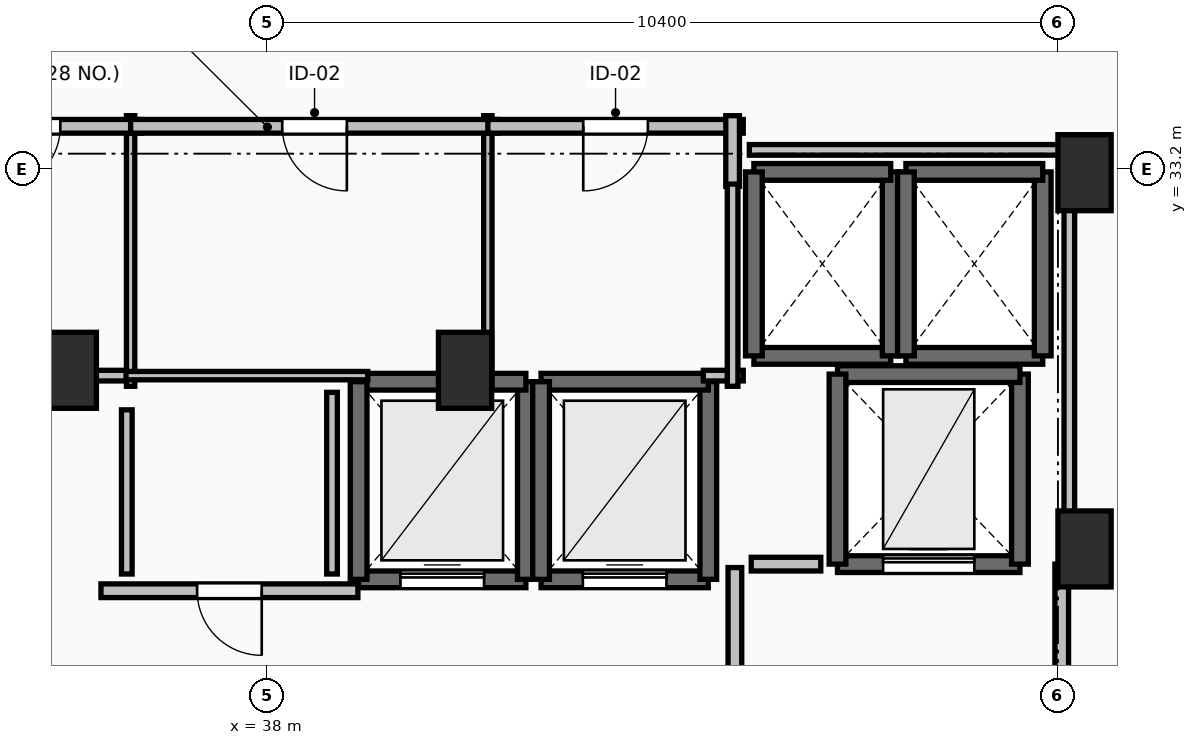
"""IFC4 building model, lengths in metres.
Left out: names, types, materials, properties, quantities, classifications, styles, units other than length and angle.
Written with IfcOpenShell. Run it as: python <this file> out.ifc"""

import sys

from ifc_helpers import new_model, si_unit, direction, frame, frame_2d, origin, origin_2d, place, context, subcontext, project, spatial, rectangle, extrude, element, fill, save


model = new_model("IFC4")
c1 = context("Model", 3, precision=1e-05, world=origin(), true_north=direction((0.0, 1.0)))
c2 = subcontext(c1, "Body", "Model", "MODEL_VIEW")
j1 = project(units=[si_unit("LENGTHUNIT", "METRE"), si_unit("PLANEANGLEUNIT", "RADIAN")], contexts=[c1])
p1 = place(None, origin())
s1 = spatial("IfcSite", under=j1, at=p1, CompositionType="ELEMENT")
p2 = place(p1, origin())
s2 = spatial("IfcBuilding", under=s1, at=p2, CompositionType="ELEMENT")
p3 = place(p2, frame((0.0, 0.0, 259.1)))
s3 = spatial("IfcBuildingStorey", under=s2, at=p3, CompositionType="ELEMENT", Elevation=259.1)
for number, where, z_axis, x_axis in (
    (1, (48.75, 33.15, 0.0), (0.0, 0.0, 1.0), (1.0, 0.0, 0.0)),
    (2, (48.75, 28.2, 0.0), (0.0, 0.0, 1.0), (1.0, 0.0, 0.0)),
    (3, (35.4, 30.55, 0.0), (0.0, 0.0, 1.0), (1.0, 0.0, 0.0)),
    (4, (40.6, 30.55, 0.0), (0.0, 0.0, 1.0), (1.0, 0.0, 0.0)),
):
    element("IfcColumn", number, at=place(p3, frame(where, z_axis=z_axis, x_axis=x_axis)), inside=s3, PredefinedType="PILASTER", context=c2, shape_type="SweptSolid", body=[
        extrude(rectangle(XDim=0.7, YDim=1.0, at=origin_2d()), origin(), (0.0, 0.0, 1.0), 3.55),
    ])
p4 = place(p3, frame((39.2, 27.8, 0.0), z_axis=(0.0, 0.0, 1.0), x_axis=(1.0, 0.0, 0.0)))
e5 = element("IfcWall", 5, at=p4, inside=s3, PredefinedType="SOLIDWALL", context=c2, shape_type="SweptSolid", body=[
    extrude(rectangle(XDim=2.2, YDim=0.22, at=frame_2d((1.1, 0.0))), origin(), (0.0, 0.0, 1.0), 3.29),
])
p5 = place(p4, frame((0.55, 0.0, 0.0)))
e6 = element("IfcOpeningElement", 6, at=p5, cuts=e5, PredefinedType="OPENING", context=c2, shape_type="SweptSolid", body=[
    extrude(rectangle(XDim=1.1, YDim=2.2, at=frame_2d((0.55, 1.1))), frame((0.0, 0.125, 0.0), z_axis=(0.0, -1.0, 0.0), x_axis=(1.0, 0.0, 0.0)), (0.0, 0.0, 1.0), 0.25),
])
p6 = place(p3, frame((41.4, 27.8, 0.0), z_axis=(0.0, 0.0, 1.0), x_axis=(0.0, 1.0, 0.0)))
e7 = element("IfcWall", 7, at=p6, inside=s3, PredefinedType="SOLIDWALL", context=c2, shape_type="SweptSolid", body=[
    extrude(rectangle(XDim=2.6, YDim=0.22, at=frame_2d((1.3, 0.0))), origin(), (0.0, 0.0, 1.0), 3.29),
])
p7 = place(p3, frame((41.4, 30.4, 0.0), z_axis=(0.0, 0.0, 1.0), x_axis=(-1.0, 0.0, 0.0)))
e8 = element("IfcWall", 8, at=p7, inside=s3, PredefinedType="SOLIDWALL", context=c2, shape_type="SweptSolid", body=[
    extrude(rectangle(XDim=2.2, YDim=0.22, at=frame_2d((1.1, 0.0))), origin(), (0.0, 0.0, 1.0), 3.29),
])
p8 = place(p3, frame((39.2, 30.4, 0.0), z_axis=(0.0, 0.0, 1.0), x_axis=(0.0, -1.0, 0.0)))
e9 = element("IfcWall", 9, at=p8, inside=s3, PredefinedType="SOLIDWALL", context=c2, shape_type="SweptSolid", body=[
    extrude(rectangle(XDim=2.6, YDim=0.22, at=frame_2d((1.3, 0.0))), origin(), (0.0, 0.0, 1.0), 3.29),
])
p9 = place(p3, frame((41.6, 27.8, 0.0), z_axis=(0.0, 0.0, 1.0), x_axis=(1.0, 0.0, 0.0)))
e10 = element("IfcWall", 10, at=p9, inside=s3, PredefinedType="SOLIDWALL", context=c2, shape_type="SweptSolid", body=[
    extrude(rectangle(XDim=2.2, YDim=0.22, at=frame_2d((1.1, 0.0))), origin(), (0.0, 0.0, 1.0), 3.29),
])
p10 = place(p9, frame((0.55, 0.0, 0.0)))
e11 = element("IfcOpeningElement", 11, at=p10, cuts=e10, PredefinedType="OPENING", context=c2, shape_type="SweptSolid", body=[
    extrude(rectangle(XDim=1.1, YDim=2.2, at=frame_2d((0.55, 1.1))), frame((0.0, 0.125, 0.0), z_axis=(0.0, -1.0, 0.0), x_axis=(1.0, 0.0, 0.0)), (0.0, 0.0, 1.0), 0.25),
])
p11 = place(p3, frame((43.8, 27.8, 0.0), z_axis=(0.0, 0.0, 1.0), x_axis=(0.0, 1.0, 0.0)))
e12 = element("IfcWall", 12, at=p11, inside=s3, PredefinedType="SOLIDWALL", context=c2, shape_type="SweptSolid", body=[
    extrude(rectangle(XDim=2.6, YDim=0.22, at=frame_2d((1.3, 0.0))), origin(), (0.0, 0.0, 1.0), 3.29),
])
p12 = place(p3, frame((43.8, 30.4, 0.0), z_axis=(0.0, 0.0, 1.0), x_axis=(-1.0, 0.0, 0.0)))
e13 = element("IfcWall", 13, at=p12, inside=s3, PredefinedType="SOLIDWALL", context=c2, shape_type="SweptSolid", body=[
    extrude(rectangle(XDim=2.2, YDim=0.22, at=frame_2d((1.1, 0.0))), origin(), (0.0, 0.0, 1.0), 3.29),
])
p13 = place(p3, frame((41.6, 30.4, 0.0), z_axis=(0.0, 0.0, 1.0), x_axis=(0.0, -1.0, 0.0)))
e14 = element("IfcWall", 14, at=p13, inside=s3, PredefinedType="SOLIDWALL", context=c2, shape_type="SweptSolid", body=[
    extrude(rectangle(XDim=2.6, YDim=0.22, at=frame_2d((1.3, 0.0))), origin(), (0.0, 0.0, 1.0), 3.29),
])
p14 = place(p3, frame((44.4, 30.74, 0.0), z_axis=(0.0, 0.0, 1.0), x_axis=(1.0, 0.0, 0.0)))
e15 = element("IfcWall", 15, at=p14, inside=s3, PredefinedType="SOLIDWALL", context=c2, shape_type="SweptSolid", body=[
    extrude(rectangle(XDim=1.8, YDim=0.22, at=frame_2d((0.9, 0.0))), origin(), (0.0, 0.0, 1.0), 3.29),
])
p15 = place(p3, frame((46.2, 30.74, 0.0), z_axis=(0.0, 0.0, 1.0), x_axis=(0.0, 1.0, 0.0)))
e16 = element("IfcWall", 16, at=p15, inside=s3, PredefinedType="SOLIDWALL", context=c2, shape_type="SweptSolid", body=[
    extrude(rectangle(XDim=2.42, YDim=0.22, at=frame_2d((1.21, 0.0))), origin(), (0.0, 0.0, 1.0), 3.29),
])
p16 = place(p3, frame((46.2, 33.16, 0.0), z_axis=(0.0, 0.0, 1.0), x_axis=(-1.0, 0.0, 0.0)))
e17 = element("IfcWall", 17, at=p16, inside=s3, PredefinedType="SOLIDWALL", context=c2, shape_type="SweptSolid", body=[
    extrude(rectangle(XDim=1.8, YDim=0.22, at=frame_2d((0.9, 0.0))), origin(), (0.0, 0.0, 1.0), 3.29),
])
p17 = place(p3, frame((44.4, 33.16, 0.0), z_axis=(0.0, 0.0, 1.0), x_axis=(0.0, -1.0, 0.0)))
e18 = element("IfcWall", 18, at=p17, inside=s3, PredefinedType="SOLIDWALL", context=c2, shape_type="SweptSolid", body=[
    extrude(rectangle(XDim=2.42, YDim=0.22, at=frame_2d((1.21, 0.0))), origin(), (0.0, 0.0, 1.0), 3.29),
])
p18 = place(p3, frame((46.4, 30.74, 0.0), z_axis=(0.0, 0.0, 1.0), x_axis=(1.0, 0.0, 0.0)))
e19 = element("IfcWall", 19, at=p18, inside=s3, PredefinedType="SOLIDWALL", context=c2, shape_type="SweptSolid", body=[
    extrude(rectangle(XDim=1.8, YDim=0.22, at=frame_2d((0.9, 0.0))), origin(), (0.0, 0.0, 1.0), 3.29),
])
p19 = place(p3, frame((48.2, 30.74, 0.0), z_axis=(0.0, 0.0, 1.0), x_axis=(0.0, 1.0, 0.0)))
e20 = element("IfcWall", 20, at=p19, inside=s3, PredefinedType="SOLIDWALL", context=c2, shape_type="SweptSolid", body=[
    extrude(rectangle(XDim=2.42, YDim=0.22, at=frame_2d((1.21, 0.0))), origin(), (0.0, 0.0, 1.0), 3.29),
])
p20 = place(p3, frame((48.2, 33.16, 0.0), z_axis=(0.0, 0.0, 1.0), x_axis=(-1.0, 0.0, 0.0)))
e21 = element("IfcWall", 21, at=p20, inside=s3, PredefinedType="SOLIDWALL", context=c2, shape_type="SweptSolid", body=[
    extrude(rectangle(XDim=1.8, YDim=0.22, at=frame_2d((0.9, 0.0))), origin(), (0.0, 0.0, 1.0), 3.29),
])
p21 = place(p3, frame((46.4, 33.16, 0.0), z_axis=(0.0, 0.0, 1.0), x_axis=(0.0, -1.0, 0.0)))
e22 = element("IfcWall", 22, at=p21, inside=s3, PredefinedType="SOLIDWALL", context=c2, shape_type="SweptSolid", body=[
    extrude(rectangle(XDim=2.42, YDim=0.22, at=frame_2d((1.21, 0.0))), origin(), (0.0, 0.0, 1.0), 3.29),
])
p22 = place(p3, frame((45.5, 28.0, 0.0), z_axis=(0.0, 0.0, 1.0), x_axis=(1.0, 0.0, 0.0)))
e23 = element("IfcWall", 23, at=p22, inside=s3, PredefinedType="SHEAR", context=c2, shape_type="SweptSolid", body=[
    extrude(rectangle(XDim=2.4, YDim=0.22, at=frame_2d((1.2, 0.0))), origin(), (0.0, 0.0, 1.0), 3.29),
])
p23 = place(p22, frame((0.6, 0.0, 0.0)))
e24 = element("IfcOpeningElement", 24, at=p23, cuts=e23, PredefinedType="OPENING", context=c2, shape_type="SweptSolid", body=[
    extrude(rectangle(XDim=1.2, YDim=2.2, at=frame_2d((0.6, 1.1))), frame((0.0, 0.125, 0.0), z_axis=(0.0, -1.0, 0.0), x_axis=(1.0, 0.0, 0.0)), (0.0, 0.0, 1.0), 0.25),
])
p24 = place(p3, frame((47.9, 28.0, 0.0), z_axis=(0.0, 0.0, 1.0), x_axis=(0.0, 1.0, 0.0)))
e25 = element("IfcWall", 25, at=p24, inside=s3, PredefinedType="SHEAR", context=c2, shape_type="SweptSolid", body=[
    extrude(rectangle(XDim=2.5, YDim=0.22, at=frame_2d((1.25, 0.0))), origin(), (0.0, 0.0, 1.0), 3.29),
])
p25 = place(p3, frame((47.9, 30.5, 0.0), z_axis=(0.0, 0.0, 1.0), x_axis=(-1.0, 0.0, 0.0)))
e26 = element("IfcWall", 26, at=p25, inside=s3, PredefinedType="SHEAR", context=c2, shape_type="SweptSolid", body=[
    extrude(rectangle(XDim=2.4, YDim=0.22, at=frame_2d((1.2, 0.0))), origin(), (0.0, 0.0, 1.0), 3.29),
])
p26 = place(p3, frame((45.5, 30.5, 0.0), z_axis=(0.0, 0.0, 1.0), x_axis=(0.0, -1.0, 0.0)))
e27 = element("IfcWall", 27, at=p26, inside=s3, PredefinedType="SHEAR", context=c2, shape_type="SweptSolid", body=[
    extrude(rectangle(XDim=2.5, YDim=0.22, at=frame_2d((1.25, 0.0))), origin(), (0.0, 0.0, 1.0), 3.29),
])
p27 = place(p3, frame((44.15, 27.955, 0.0), z_axis=(0.0, 0.0, 1.0), x_axis=(0.0, -1.0, 0.0)))
e28 = element("IfcWall", 28, at=p27, inside=s3, PredefinedType="PARTITIONING", context=c2, shape_type="SweptSolid", body=[
    extrude(rectangle(XDim=3.91, YDim=0.18, at=frame_2d((1.955, 0.0))), origin(), (0.0, 0.0, 1.0), 3.29),
])
p28 = place(p27, frame((1.355, 0.0, 0.0)))
e29 = element("IfcOpeningElement", 29, at=p28, cuts=e28, PredefinedType="OPENING", context=c2, shape_type="SweptSolid", body=[
    extrude(rectangle(XDim=1.2, YDim=2.15, at=frame_2d((0.6, 1.075))), frame((0.0, 0.105, 0.0), z_axis=(0.0, -1.0, 0.0), x_axis=(1.0, 0.0, 0.0)), (0.0, 0.0, 1.0), 0.21),
])
p29 = place(p3, frame((48.45, 23.95, 0.0), z_axis=(0.0, 0.0, 1.0), x_axis=(0.0, 1.0, 0.0)))
e30 = element("IfcWall", 30, at=p29, inside=s3, PredefinedType="PARTITIONING", context=c2, shape_type="SweptSolid", body=[
    extrude(rectangle(XDim=4.05, YDim=0.18, at=frame_2d((2.025, 0.0))), origin(), (0.0, 0.0, 1.0), 3.29),
])
p30 = place(p29, frame((1.425, 0.0, 0.0)))
e31 = element("IfcOpeningElement", 31, at=p30, cuts=e30, PredefinedType="OPENING", context=c2, shape_type="SweptSolid", body=[
    extrude(rectangle(XDim=1.2, YDim=2.15, at=frame_2d((0.6, 1.075))), frame((0.0, 0.105, 0.0), z_axis=(0.0, -1.0, 0.0), x_axis=(1.0, 0.0, 0.0)), (0.0, 0.0, 1.0), 0.21),
])
p31 = place(p3, frame((39.19, 27.65, 0.0), z_axis=(0.0, 0.0, 1.0), x_axis=(-1.0, 0.0, 0.0)))
e32 = element("IfcWall", 32, at=p31, inside=s3, PredefinedType="PARTITIONING", context=c2, shape_type="SweptSolid", body=[
    extrude(rectangle(XDim=3.38, YDim=0.18, at=frame_2d((1.69, 0.0))), origin(), (0.0, 0.0, 1.0), 3.29),
])
p32 = place(p31, frame((1.265, 0.0, 0.0)))
e33 = element("IfcOpeningElement", 33, at=p32, cuts=e32, PredefinedType="OPENING", context=c2, shape_type="SweptSolid", body=[
    extrude(rectangle(XDim=0.85, YDim=2.1, at=frame_2d((0.425, 1.05))), frame((0.0, 0.105, 0.0), z_axis=(0.0, -1.0, 0.0), x_axis=(1.0, 0.0, 0.0)), (0.0, 0.0, 1.0), 0.21),
])
p33 = place(p3, frame((36.2, 30.34, 0.0), z_axis=(0.0, 0.0, 1.0), x_axis=(0.0, 1.0, 0.0)))
e34 = element("IfcWall", 34, at=p33, inside=s3, PredefinedType="PARTITIONING", context=c2, shape_type="SweptSolid", body=[
    extrude(rectangle(XDim=3.56, YDim=0.11, at=frame_2d((1.78, 0.0))), origin(), (0.0, 0.0, 1.0), 2.482),
])
p34 = place(p3, frame((36.34, 33.76, 0.0), z_axis=(0.0, 0.0, 1.0), x_axis=(-1.0, 0.0, 0.0)))
e35 = element("IfcWall", 35, at=p34, inside=s3, PredefinedType="PARTITIONING", context=c2, shape_type="SweptSolid", body=[
    extrude(rectangle(XDim=2.98, YDim=0.18, at=frame_2d((1.49, 0.0))), origin(), (0.0, 0.0, 1.0), 3.29),
])
p35 = place(p34, frame((1.065, 0.0, 0.0)))
e36 = element("IfcOpeningElement", 36, at=p35, cuts=e35, PredefinedType="OPENING", context=c2, shape_type="SweptSolid", body=[
    extrude(rectangle(XDim=0.85, YDim=2.1, at=frame_2d((0.425, 1.05))), frame((0.0, 0.105, 0.0), z_axis=(0.0, -1.0, 0.0), x_axis=(1.0, 0.0, 0.0)), (0.0, 0.0, 1.0), 0.21),
])
p36 = place(p3, frame((40.9, 30.34, 0.0), z_axis=(0.0, 0.0, 1.0), x_axis=(0.0, 1.0, 0.0)))
e37 = element("IfcWall", 37, at=p36, inside=s3, PredefinedType="PARTITIONING", context=c2, shape_type="SweptSolid", body=[
    extrude(rectangle(XDim=3.56, YDim=0.11, at=frame_2d((1.78, 0.0))), origin(), (0.0, 0.0, 1.0), 3.29),
])
p37 = place(p3, frame((36.11, 30.48, 0.0), z_axis=(0.0, 0.0, 1.0), x_axis=(1.0, 0.0, 0.0)))
e38 = element("IfcWall", 38, at=p37, inside=s3, PredefinedType="PARTITIONING", context=c2, shape_type="SweptSolid", body=[
    extrude(rectangle(XDim=3.21, YDim=0.11, at=frame_2d((1.605, 0.0))), origin(), (0.0, 0.0, 1.0), 2.482),
])
p38 = place(p3, frame((41.04, 33.76, 0.0), z_axis=(0.0, 0.0, 1.0), x_axis=(-1.0, 0.0, 0.0)))
e39 = element("IfcWall", 39, at=p38, inside=s3, PredefinedType="PARTITIONING", context=c2, shape_type="SweptSolid", body=[
    extrude(rectangle(XDim=4.84, YDim=0.18, at=frame_2d((2.42, 0.0))), origin(), (0.0, 0.0, 1.0), 3.29),
])
p39 = place(p38, frame((1.995, 0.0, 0.0)))
e40 = element("IfcOpeningElement", 40, at=p39, cuts=e39, PredefinedType="OPENING", context=c2, shape_type="SweptSolid", body=[
    extrude(rectangle(XDim=0.85, YDim=2.1, at=frame_2d((0.425, 1.05))), frame((0.0, 0.105, 0.0), z_axis=(0.0, -1.0, 0.0), x_axis=(1.0, 0.0, 0.0)), (0.0, 0.0, 1.0), 0.21),
])
p40 = place(p3, frame((44.26, 33.76, 0.0), z_axis=(0.0, 0.0, 1.0), x_axis=(-1.0, 0.0, 0.0)))
e41 = element("IfcWall", 41, at=p40, inside=s3, PredefinedType="PARTITIONING", context=c2, shape_type="SweptSolid", body=[
    extrude(rectangle(XDim=3.36, YDim=0.18, at=frame_2d((1.68, 0.0))), origin(), (0.0, 0.0, 1.0), 3.29),
])
p41 = place(p40, frame((1.255, 0.0, 0.0)))
e42 = element("IfcOpeningElement", 42, at=p41, cuts=e41, PredefinedType="OPENING", context=c2, shape_type="SweptSolid", body=[
    extrude(rectangle(XDim=0.85, YDim=2.1, at=frame_2d((0.425, 1.05))), frame((0.0, 0.105, 0.0), z_axis=(0.0, -1.0, 0.0), x_axis=(1.0, 0.0, 0.0)), (0.0, 0.0, 1.0), 0.21),
])
p42 = place(p3, frame((44.12, 32.97, 0.0), z_axis=(0.0, 0.0, 1.0), x_axis=(0.0, 1.0, 0.0)))
e43 = element("IfcWall", 43, at=p42, inside=s3, PredefinedType="PARTITIONING", context=c2, shape_type="SweptSolid", body=[
    extrude(rectangle(XDim=0.93, YDim=0.18, at=frame_2d((0.465, 0.0))), origin(), (0.0, 0.0, 1.0), 3.29),
])
p43 = place(p3, frame((45.28, 28.0, 0.0), z_axis=(0.0, 0.0, 1.0), x_axis=(-1.0, 0.0, 0.0)))
e44 = element("IfcWall", 44, at=p43, inside=s3, PredefinedType="PARTITIONING", context=c2, shape_type="SweptSolid", body=[
    extrude(rectangle(XDim=0.915, YDim=0.18, at=frame_2d((0.458, 0.0))), origin(), (0.0, 0.0, 1.0), 3.29),
])
p44 = place(p3, frame((35.14, 30.48, 0.0), z_axis=(0.0, 0.0, 1.0), x_axis=(1.0, 0.0, 0.0)))
e45 = element("IfcWall", 45, at=p44, inside=s3, PredefinedType="PARTITIONING", context=c2, shape_type="SweptSolid", body=[
    extrude(rectangle(XDim=1.0, YDim=0.14, at=frame_2d((0.5, 0.0))), origin(), (0.0, 0.0, 1.0), 2.482),
])
p45 = place(p3, frame((43.735, 30.48, 0.0), z_axis=(0.0, 0.0, 1.0), x_axis=(1.0, 0.0, 0.0)))
e46 = element("IfcWall", 46, at=p45, inside=s3, PredefinedType="PARTITIONING", context=c2, shape_type="SweptSolid", body=[
    extrude(rectangle(XDim=0.525, YDim=0.14, at=frame_2d((0.262, 0.0))), origin(), (0.0, 0.0, 1.0), 3.29),
])
p46 = place(p3, frame((44.12, 30.34, 0.0), z_axis=(0.0, 0.0, 1.0), x_axis=(0.0, 1.0, 0.0)))
e47 = element("IfcWall", 47, at=p46, inside=s3, PredefinedType="PARTITIONING", context=c2, shape_type="SweptSolid", body=[
    extrude(rectangle(XDim=2.66, YDim=0.14, at=frame_2d((1.33, 0.0))), origin(), (0.0, 0.0, 1.0), 3.29),
])
p47 = place(p3, frame((36.15, 30.03, 0.0), z_axis=(0.0, 0.0, 1.0), x_axis=(0.0, -1.0, 0.0)))
e48 = element("IfcWall", 48, at=p47, inside=s3, PredefinedType="PARTITIONING", context=c2, shape_type="SweptSolid", body=[
    extrude(rectangle(XDim=2.16, YDim=0.14, at=frame_2d((1.08, 0.0))), origin(), (0.0, 0.0, 1.0), 3.29),
])
p48 = place(p3, frame((38.85, 27.87, 0.0), z_axis=(0.0, 0.0, 1.0), x_axis=(0.0, 1.0, 0.0)))
e49 = element("IfcWall", 49, at=p48, inside=s3, PredefinedType="PARTITIONING", context=c2, shape_type="SweptSolid", body=[
    extrude(rectangle(XDim=2.39, YDim=0.14, at=frame_2d((1.195, 0.0))), origin(), (0.0, 0.0, 1.0), 3.29),
])
p49 = place(p3, frame((48.55, 28.196, 0.0), z_axis=(0.0, 0.0, 1.0), x_axis=(0.0, 1.0, 0.0)))
e50 = element("IfcWall", 50, at=p49, inside=s3, PredefinedType="PARTITIONING", context=c2, shape_type="SweptSolid", body=[
    extrude(rectangle(XDim=5.254, YDim=0.14, at=frame_2d((2.627, 0.0))), origin(), (0.0, 0.0, 1.0), 2.482),
])
p50 = place(p3, frame((48.55, 33.45, 0.0), z_axis=(0.0, 0.0, 1.0), x_axis=(-1.0, 0.0, 0.0)))
e51 = element("IfcWall", 51, at=p50, inside=s3, PredefinedType="PARTITIONING", context=c2, shape_type="SweptSolid", body=[
    extrude(rectangle(XDim=4.21, YDim=0.14, at=frame_2d((2.105, 0.0))), origin(), (0.0, 0.0, 1.0), 2.482),
])
p51 = place(p5, origin())
e52 = element("IfcDoor", 52, at=p51, inside=s3, OperationType="SLIDING_TO_LEFT", PredefinedType="DOOR", context=c2, shape_type="SweptSolid", body=[
    extrude(rectangle(XDim=1.1, YDim=2.2, at=frame_2d((0.55, 1.1))), frame((0.0, 0.025, 0.0), z_axis=(0.0, -1.0, 0.0), x_axis=(1.0, 0.0, 0.0)), (0.0, 0.0, 1.0), 0.05),
])
fill(e6, e52)
p52 = place(p10, origin())
e53 = element("IfcDoor", 53, at=p52, inside=s3, OperationType="SLIDING_TO_LEFT", PredefinedType="DOOR", context=c2, shape_type="SweptSolid", body=[
    extrude(rectangle(XDim=1.1, YDim=2.2, at=frame_2d((0.55, 1.1))), frame((0.0, 0.025, 0.0), z_axis=(0.0, -1.0, 0.0), x_axis=(1.0, 0.0, 0.0)), (0.0, 0.0, 1.0), 0.05),
])
fill(e11, e53)
p53 = place(p23, origin())
e54 = element("IfcDoor", 54, at=p53, inside=s3, OperationType="SLIDING_TO_LEFT", PredefinedType="DOOR", context=c2, shape_type="SweptSolid", body=[
    extrude(rectangle(XDim=1.2, YDim=2.2, at=frame_2d((0.6, 1.1))), frame((0.0, 0.025, 0.0), z_axis=(0.0, -1.0, 0.0), x_axis=(1.0, 0.0, 0.0)), (0.0, 0.0, 1.0), 0.05),
])
fill(e24, e54)
p54 = place(p32, origin())
e55 = element("IfcDoor", 55, at=p54, inside=s3, OperationType="SINGLE_SWING_LEFT", PredefinedType="DOOR", context=c2, shape_type="SweptSolid", body=[
    extrude(rectangle(XDim=0.85, YDim=2.1, at=frame_2d((0.425, 1.05))), frame((0.0, 0.025, 0.0), z_axis=(0.0, -1.0, 0.0), x_axis=(1.0, 0.0, 0.0)), (0.0, 0.0, 1.0), 0.05),
])
fill(e33, e55)
p55 = place(p35, origin())
e56 = element("IfcDoor", 56, at=p55, inside=s3, OperationType="SINGLE_SWING_RIGHT", PredefinedType="DOOR", context=c2, shape_type="SweptSolid", body=[
    extrude(rectangle(XDim=0.85, YDim=2.1, at=frame_2d((0.425, 1.05))), frame((0.0, 0.025, 0.0), z_axis=(0.0, -1.0, 0.0), x_axis=(1.0, 0.0, 0.0)), (0.0, 0.0, 1.0), 0.05),
])
fill(e36, e56)
p56 = place(p39, origin())
e57 = element("IfcDoor", 57, at=p56, inside=s3, OperationType="SINGLE_SWING_LEFT", PredefinedType="DOOR", context=c2, shape_type="SweptSolid", body=[
    extrude(rectangle(XDim=0.85, YDim=2.1, at=frame_2d((0.425, 1.05))), frame((0.0, 0.025, 0.0), z_axis=(0.0, -1.0, 0.0), x_axis=(1.0, 0.0, 0.0)), (0.0, 0.0, 1.0), 0.05),
])
fill(e40, e57)
p57 = place(p41, origin())
e58 = element("IfcDoor", 58, at=p57, inside=s3, OperationType="SINGLE_SWING_RIGHT", PredefinedType="DOOR", context=c2, shape_type="SweptSolid", body=[
    extrude(rectangle(XDim=0.85, YDim=2.1, at=frame_2d((0.425, 1.05))), frame((0.0, 0.025, 0.0), z_axis=(0.0, -1.0, 0.0), x_axis=(1.0, 0.0, 0.0)), (0.0, 0.0, 1.0), 0.05),
])
fill(e42, e58)
save(model, sys.argv[1])
